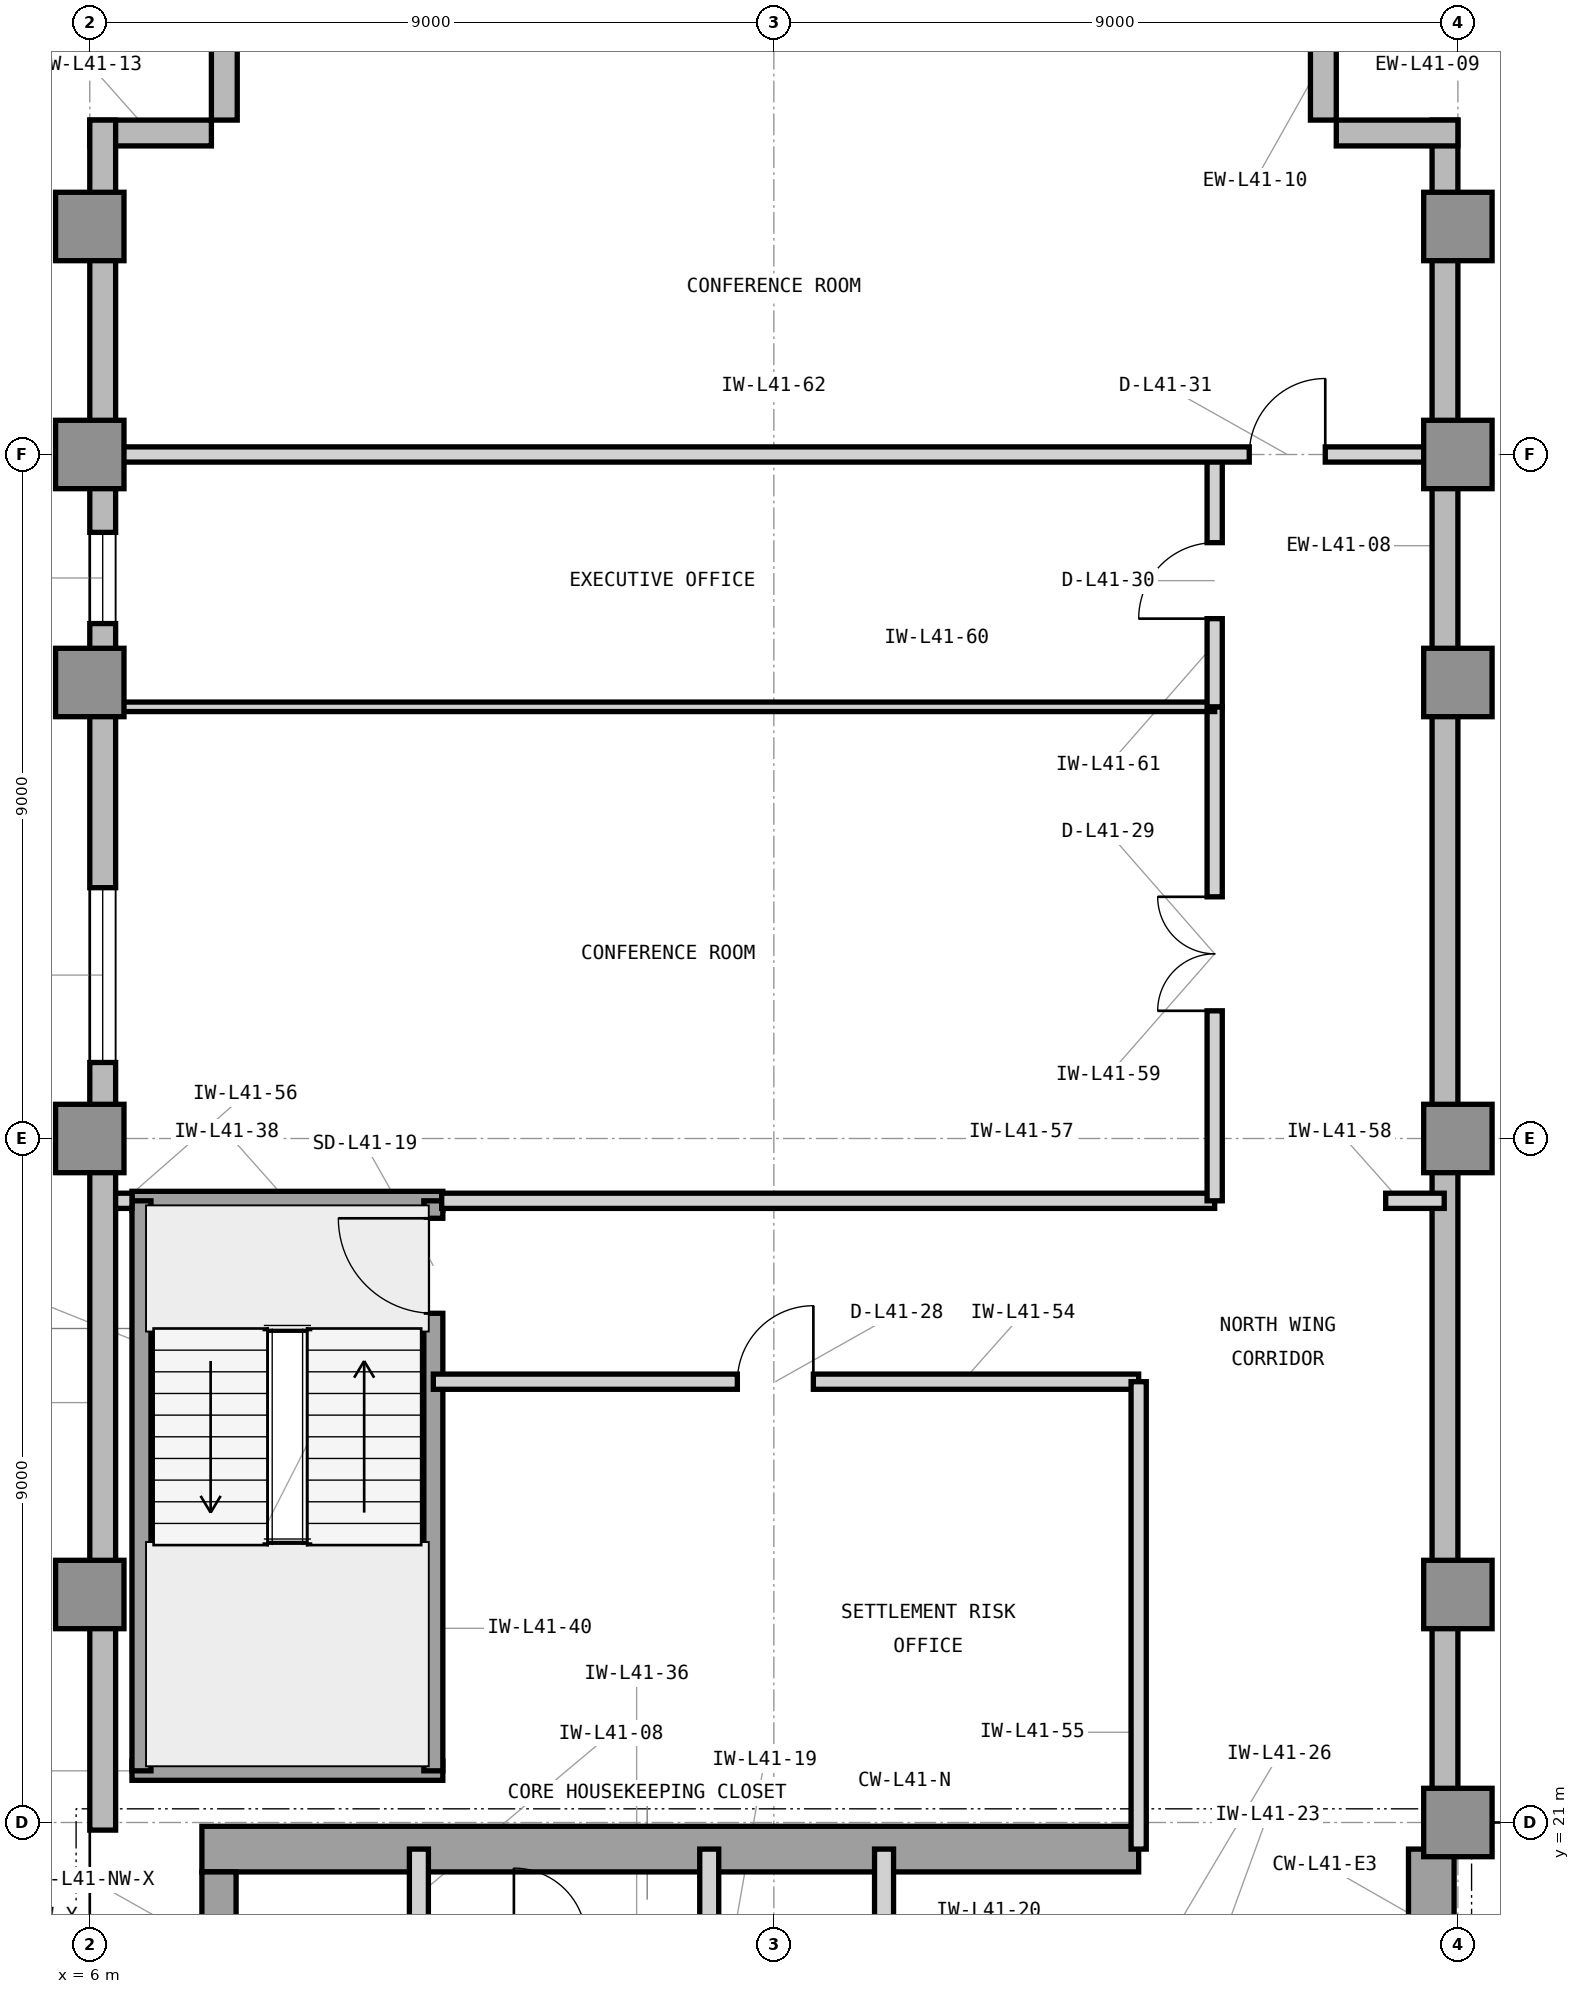
"""IFC4 building model, lengths in metres.
Left out: names, types, materials, properties, quantities, classifications, styles, units other than length and angle.
Written with IfcOpenShell. Run it as: python <this file> out.ifc"""

import sys

from ifc_helpers import new_model, si_unit, direction, frame, frame_2d, origin, origin_2d, place, context, subcontext, project, spatial, rectangle, extrude, element, fill, save


model = new_model("IFC4")
c1 = context("Model", 3, precision=1e-05, world=origin(), true_north=direction((0.0, 1.0)))
c2 = subcontext(c1, "Body", "Model", "MODEL_VIEW")
j1 = project(units=[si_unit("LENGTHUNIT", "METRE"), si_unit("PLANEANGLEUNIT", "RADIAN")], contexts=[c1])
p1 = place(None, origin())
s1 = spatial("IfcSite", under=j1, at=p1, CompositionType="ELEMENT")
p2 = place(p1, origin())
s2 = spatial("IfcBuilding", under=s1, at=p2, CompositionType="ELEMENT")
p3 = place(p2, frame((0.0, 0.0, 172.2)))
s3 = spatial("IfcBuildingStorey", under=s2, at=p3, CompositionType="ELEMENT", Elevation=172.2)
p4 = place(p3, frame((7.475, 20.65, 0.0), z_axis=(0.0, 0.0, 1.0), x_axis=(1.0, 0.0, 0.0)))
e1 = element("IfcWall", 1, at=p4, inside=s3, PredefinedType="SHEAR", context=c2, shape_type="SweptSolid", body=[
    extrude(rectangle(XDim=12.325, YDim=0.6, at=frame_2d((6.163, 0.0))), origin(), (0.0, 0.0, 1.0), 3.9),
])
p5 = place(p3, frame((23.65, 16.6, 0.0), z_axis=(0.0, 0.0, 1.0), x_axis=(0.0, 1.0, 0.0)))
e2 = element("IfcWall", 2, at=p5, inside=s3, PredefinedType="SHEAR", context=c2, shape_type="SweptSolid", body=[
    extrude(rectangle(XDim=4.05, YDim=0.6, at=frame_2d((2.025, 0.0))), origin(), (0.0, 0.0, 1.0), 3.9),
])
p6 = place(p3, frame((7.7, 19.575, 0.0), z_axis=(0.0, 0.0, 1.0), x_axis=(0.0, 1.0, 0.0)))
e3 = element("IfcWall", 3, at=p6, inside=s3, PredefinedType="SHEAR", context=c2, shape_type="SweptSolid", body=[
    extrude(rectangle(XDim=0.775, YDim=0.45, at=frame_2d((0.388, 0.0))), origin(), (0.0, 0.0, 1.0), 3.9),
])
for number, where, z_axis, x_axis in (
    (4, (24.0, 21.0, 0.0), (0.0, 0.0, 1.0), (1.0, 0.0, 0.0)),
    (5, (6.0, 24.0, 0.0), (0.0, 0.0, 1.0), (1.0, 0.0, 0.0)),
    (6, (24.0, 24.0, 0.0), (0.0, 0.0, 1.0), (1.0, 0.0, 0.0)),
    (7, (6.0, 30.0, 0.0), (0.0, 0.0, 1.0), (1.0, 0.0, 0.0)),
    (8, (24.0, 30.0, 0.0), (0.0, 0.0, 1.0), (1.0, 0.0, 0.0)),
    (9, (6.0, 36.0, 0.0), (0.0, 0.0, 1.0), (1.0, 0.0, 0.0)),
    (10, (24.0, 36.0, 0.0), (0.0, 0.0, 1.0), (1.0, 0.0, 0.0)),
    (11, (6.0, 39.0, 0.0), (0.0, 0.0, 1.0), (1.0, 0.0, 0.0)),
    (12, (24.0, 39.0, 0.0), (0.0, 0.0, 1.0), (1.0, 0.0, 0.0)),
    (13, (6.0, 42.0, 0.0), (0.0, 0.0, 1.0), (1.0, 0.0, 0.0)),
    (14, (24.0, 42.0, 0.0), (0.0, 0.0, 1.0), (1.0, 0.0, 0.0)),
):
    element("IfcColumn", number, at=place(p3, frame(where, z_axis=z_axis, x_axis=x_axis)), inside=s3, PredefinedType="COLUMN", context=c2, shape_type="SweptSolid", body=[
        extrude(rectangle(XDim=0.9, YDim=0.9, at=origin_2d()), origin(), (0.0, 0.0, 1.0), 3.9),
    ])
p7 = place(p3, frame((23.83, 21.0, 0.0), z_axis=(0.0, 0.0, 1.0), x_axis=(0.0, 1.0, 0.0)))
e15 = element("IfcWall", 15, at=p7, inside=s3, PredefinedType="STANDARD", context=c2, shape_type="SweptSolid", body=[
    extrude(rectangle(XDim=22.4, YDim=0.34, at=frame_2d((11.2, 0.0))), origin(), (0.0, 0.0, 1.0), 3.7),
])
for number, where, z_axis, x_axis in (
    (16, (24.0, 43.23, 0.0), (0.0, 0.0, 1.0), (-1.0, 0.0, 0.0)),
    (17, (22.23, 43.4, 0.0), (0.0, 0.0, 1.0), (0.0, 1.0, 0.0)),
    (18, (7.77, 45.0, 0.0), (0.0, 0.0, 1.0), (0.0, -1.0, 0.0)),
    (19, (7.6, 43.23, 0.0), (0.0, 0.0, 1.0), (-1.0, 0.0, 0.0)),
):
    element("IfcWall", number, at=place(p3, frame(where, z_axis=z_axis, x_axis=x_axis)), inside=s3, PredefinedType="STANDARD", context=c2, shape_type="SweptSolid", body=[
        extrude(rectangle(XDim=1.6, YDim=0.34, at=frame_2d((0.8, 0.0))), origin(), (0.0, 0.0, 1.0), 3.7),
    ])
p8 = place(p3, frame((6.17, 43.4, 0.0), z_axis=(0.0, 0.0, 1.0), x_axis=(0.0, -1.0, 0.0)))
e20 = element("IfcWall", 20, at=p8, inside=s3, PredefinedType="STANDARD", context=c2, shape_type="SweptSolid", body=[
    extrude(rectangle(XDim=22.5, YDim=0.34, at=frame_2d((11.25, 0.0))), origin(), (0.0, 0.0, 1.0), 3.7),
])
p9 = place(p8, frame((10.1, 0.0, 0.9)))
e21 = element("IfcOpeningElement", 21, at=p9, cuts=e20, PredefinedType="OPENING", context=c2, shape_type="SweptSolid", body=[
    extrude(rectangle(XDim=2.3, YDim=2.2, at=frame_2d((1.15, 1.1))), frame((0.0, 0.18, 0.0), z_axis=(0.0, -1.0, 0.0), x_axis=(1.0, 0.0, 0.0)), (0.0, 0.0, 1.0), 0.36),
])
p10 = place(p8, frame((5.425, 0.0, 0.9)))
e22 = element("IfcOpeningElement", 22, at=p10, cuts=e20, PredefinedType="OPENING", context=c2, shape_type="SweptSolid", body=[
    extrude(rectangle(XDim=1.2, YDim=2.2, at=frame_2d((0.6, 1.1))), frame((0.0, 0.18, 0.0), z_axis=(0.0, -1.0, 0.0), x_axis=(1.0, 0.0, 0.0)), (0.0, 0.0, 1.0), 0.36),
])
p11 = place(p3, frame((10.33, 19.45, 0.0), z_axis=(0.0, 0.0, 1.0), x_axis=(0.0, 1.0, 0.0)))
e23 = element("IfcWall", 23, at=p11, inside=s3, PredefinedType="PARTITIONING", context=c2, shape_type="SweptSolid", body=[
    extrude(rectangle(XDim=1.2, YDim=0.25, at=frame_2d((0.6, 0.0))), origin(), (0.0, 0.0, 1.0), 3.073),
])
for number, where, z_axis, x_axis in (
    (24, (14.15, 16.7, 0.0), (0.0, 0.0, 1.0), (0.0, 1.0, 0.0)),
    (25, (16.45, 16.7, 0.0), (0.0, 0.0, 1.0), (0.0, 1.0, 0.0)),
):
    element("IfcWall", number, at=place(p3, frame(where, z_axis=z_axis, x_axis=x_axis)), inside=s3, PredefinedType="PARTITIONING", context=c2, shape_type="SweptSolid", body=[
        extrude(rectangle(XDim=3.95, YDim=0.25, at=frame_2d((1.975, 0.0))), origin(), (0.0, 0.0, 1.0), 3.69),
    ])
for number, where, z_axis, x_axis in (
    (26, (6.555, 21.68, 0.0), (0.0, 0.0, 1.0), (1.0, 0.0, 0.0)),
    (27, (6.555, 29.18, 0.0), (0.0, 0.0, 1.0), (1.0, 0.0, 0.0)),
):
    element("IfcWall", number, at=place(p3, frame(where, z_axis=z_axis, x_axis=x_axis)), inside=s3, PredefinedType="SHEAR", context=c2, shape_type="SweptSolid", body=[
        extrude(rectangle(XDim=4.09, YDim=0.25, at=frame_2d((2.045, 0.0))), origin(), (0.0, 0.0, 1.0), 3.9),
    ])
p12 = place(p3, frame((6.68, 21.68, 0.0), z_axis=(0.0, 0.0, 1.0), x_axis=(0.0, 1.0, 0.0)))
e28 = element("IfcWall", 28, at=p12, inside=s3, PredefinedType="SHEAR", context=c2, shape_type="SweptSolid", body=[
    extrude(rectangle(XDim=7.5, YDim=0.25, at=frame_2d((3.75, 0.0))), origin(), (0.0, 0.0, 1.0), 3.9),
])
p13 = place(p3, frame((10.52, 21.68, 0.0), z_axis=(0.0, 0.0, 1.0), x_axis=(0.0, 1.0, 0.0)))
e29 = element("IfcWall", 29, at=p13, inside=s3, PredefinedType="SHEAR", context=c2, shape_type="SweptSolid", body=[
    extrude(rectangle(XDim=7.5, YDim=0.25, at=frame_2d((3.75, 0.0))), origin(), (0.0, 0.0, 1.0), 3.9),
])
p14 = place(p13, frame((6.02, 0.0, 0.0)))
e30 = element("IfcOpeningElement", 30, at=p14, cuts=e29, PredefinedType="OPENING", context=c2, shape_type="SweptSolid", body=[
    extrude(rectangle(XDim=1.25, YDim=2.2, at=frame_2d((0.625, 1.1))), frame((0.0, 0.135, 0.0), z_axis=(0.0, -1.0, 0.0), x_axis=(1.0, 0.0, 0.0)), (0.0, 0.0, 1.0), 0.27),
])
p15 = place(p3, frame((10.52, 26.8, 0.0), z_axis=(0.0, 0.0, 1.0), x_axis=(1.0, 0.0, 0.0)))
e31 = element("IfcWall", 31, at=p15, inside=s3, PredefinedType="PARTITIONING", context=c2, shape_type="SweptSolid", body=[
    extrude(rectangle(XDim=9.28, YDim=0.2, at=frame_2d((4.64, 0.0))), origin(), (0.0, 0.0, 1.0), 3.69),
])
p16 = place(p15, frame((4.0, 0.0, 0.0)))
e32 = element("IfcOpeningElement", 32, at=p16, cuts=e31, PredefinedType="OPENING", context=c2, shape_type="SweptSolid", body=[
    extrude(rectangle(XDim=1.0, YDim=2.15, at=frame_2d((0.5, 1.075))), frame((0.0, 0.11, 0.0), z_axis=(0.0, -1.0, 0.0), x_axis=(1.0, 0.0, 0.0)), (0.0, 0.0, 1.0), 0.22),
])
p17 = place(p3, frame((19.8, 20.65, 0.0), z_axis=(0.0, 0.0, 1.0), x_axis=(0.0, 1.0, 0.0)))
e33 = element("IfcWall", 33, at=p17, inside=s3, PredefinedType="PARTITIONING", context=c2, shape_type="SweptSolid", body=[
    extrude(rectangle(XDim=6.15, YDim=0.2, at=frame_2d((3.075, 0.0))), origin(), (0.0, 0.0, 1.0), 3.69),
])
p18 = place(p3, frame((6.34, 29.18, 0.0), z_axis=(0.0, 0.0, 1.0), x_axis=(1.0, 0.0, 0.0)))
e34 = element("IfcWall", 34, at=p18, inside=s3, PredefinedType="PARTITIONING", context=c2, shape_type="SweptSolid", body=[
    extrude(rectangle(XDim=0.215, YDim=0.2, at=frame_2d((0.107, 0.0))), origin(), (0.0, 0.0, 1.0), 3.69),
])
p19 = place(p3, frame((10.63, 29.18, 0.0), z_axis=(0.0, 0.0, 1.0), x_axis=(1.0, 0.0, 0.0)))
e35 = element("IfcWall", 35, at=p19, inside=s3, PredefinedType="PARTITIONING", context=c2, shape_type="SweptSolid", body=[
    extrude(rectangle(XDim=10.17, YDim=0.2, at=frame_2d((5.085, 0.0))), origin(), (0.0, 0.0, 1.0), 3.69),
])
p20 = place(p3, frame((23.05, 29.18, 0.0), z_axis=(0.0, 0.0, 1.0), x_axis=(1.0, 0.0, 0.0)))
e36 = element("IfcWall", 36, at=p20, inside=s3, PredefinedType="PARTITIONING", context=c2, shape_type="SweptSolid", body=[
    extrude(rectangle(XDim=0.77, YDim=0.2, at=frame_2d((0.385, 0.0))), origin(), (0.0, 0.0, 1.0), 3.69),
])
p21 = place(p3, frame((20.8, 29.18, 0.0), z_axis=(0.0, 0.0, 1.0), x_axis=(0.0, 1.0, 0.0)))
e37 = element("IfcWall", 37, at=p21, inside=s3, PredefinedType="PARTITIONING", context=c2, shape_type="SweptSolid", body=[
    extrude(rectangle(XDim=6.5, YDim=0.2, at=frame_2d((3.25, 0.0))), origin(), (0.0, 0.0, 1.0), 3.69),
])
p22 = place(p21, frame((2.5, 0.0, 0.0)))
e38 = element("IfcOpeningElement", 38, at=p22, cuts=e37, PredefinedType="OPENING", context=c2, shape_type="SweptSolid", body=[
    extrude(rectangle(XDim=1.5, YDim=2.3, at=frame_2d((0.75, 1.15))), frame((0.0, 0.11, 0.0), z_axis=(0.0, -1.0, 0.0), x_axis=(1.0, 0.0, 0.0)), (0.0, 0.0, 1.0), 0.22),
])
p23 = place(p3, frame((6.18, 35.68, 0.0), z_axis=(0.0, 0.0, 1.0), x_axis=(1.0, 0.0, 0.0)))
e39 = element("IfcWall", 39, at=p23, inside=s3, PredefinedType="PARTITIONING", context=c2, shape_type="SweptSolid", body=[
    extrude(rectangle(XDim=14.62, YDim=0.125, at=frame_2d((7.31, 0.0))), origin(), (0.0, 0.0, 1.0), 3.69),
])
p24 = place(p3, frame((20.8, 35.68, 0.0), z_axis=(0.0, 0.0, 1.0), x_axis=(0.0, 1.0, 0.0)))
e40 = element("IfcWall", 40, at=p24, inside=s3, PredefinedType="PARTITIONING", context=c2, shape_type="SweptSolid", body=[
    extrude(rectangle(XDim=3.32, YDim=0.2, at=frame_2d((1.66, 0.0))), origin(), (0.0, 0.0, 1.0), 3.69),
])
p25 = place(p24, frame((1.16, 0.0, 0.0)))
e41 = element("IfcOpeningElement", 41, at=p25, cuts=e40, PredefinedType="OPENING", context=c2, shape_type="SweptSolid", body=[
    extrude(rectangle(XDim=1.0, YDim=2.15, at=frame_2d((0.5, 1.075))), frame((0.0, 0.11, 0.0), z_axis=(0.0, -1.0, 0.0), x_axis=(1.0, 0.0, 0.0)), (0.0, 0.0, 1.0), 0.22),
])
p26 = place(p3, frame((6.18, 39.0, 0.0), z_axis=(0.0, 0.0, 1.0), x_axis=(1.0, 0.0, 0.0)))
e42 = element("IfcWall", 42, at=p26, inside=s3, PredefinedType="PARTITIONING", context=c2, shape_type="SweptSolid", body=[
    extrude(rectangle(XDim=17.64, YDim=0.2, at=frame_2d((8.82, 0.0))), origin(), (0.0, 0.0, 1.0), 3.073),
])
p27 = place(p26, frame((15.075, 0.0, 0.0)))
e43 = element("IfcOpeningElement", 43, at=p27, cuts=e42, PredefinedType="OPENING", context=c2, shape_type="SweptSolid", body=[
    extrude(rectangle(XDim=1.0, YDim=2.15, at=frame_2d((0.5, 1.075))), frame((0.0, 0.11, 0.0), z_axis=(0.0, -1.0, 0.0), x_axis=(1.0, 0.0, 0.0)), (0.0, 0.0, 1.0), 0.22),
])
p28 = place(p9, origin())
e44 = element("IfcWindow", 44, at=p28, inside=s3, PartitioningType="SINGLE_PANEL", PredefinedType="WINDOW", context=c2, shape_type="SweptSolid", body=[
    extrude(rectangle(XDim=2.3, YDim=2.2, at=frame_2d((1.15, 1.1))), frame((0.0, 0.11, 0.0), z_axis=(0.0, -1.0, 0.0), x_axis=(1.0, 0.0, 0.0)), (0.0, 0.0, 1.0), 0.06),
])
fill(e21, e44)
p29 = place(p14, origin())
e45 = element("IfcDoor", 45, at=p29, inside=s3, OperationType="SINGLE_SWING_RIGHT", PredefinedType="DOOR", context=c2, shape_type="SweptSolid", body=[
    extrude(rectangle(XDim=1.25, YDim=2.2, at=frame_2d((0.625, 1.1))), frame((0.0, 0.025, 0.0), z_axis=(0.0, -1.0, 0.0), x_axis=(1.0, 0.0, 0.0)), (0.0, 0.0, 1.0), 0.05),
])
fill(e30, e45)
p30 = place(p16, origin())
e46 = element("IfcDoor", 46, at=p30, inside=s3, OperationType="SINGLE_SWING_RIGHT", PredefinedType="DOOR", context=c2, shape_type="SweptSolid", body=[
    extrude(rectangle(XDim=1.0, YDim=2.15, at=frame_2d((0.5, 1.075))), frame((0.0, 0.025, 0.0), z_axis=(0.0, -1.0, 0.0), x_axis=(1.0, 0.0, 0.0)), (0.0, 0.0, 1.0), 0.05),
])
fill(e32, e46)
p31 = place(p22, origin())
e47 = element("IfcDoor", 47, at=p31, inside=s3, OperationType="DOUBLE_DOOR_SINGLE_SWING", PredefinedType="DOOR", context=c2, shape_type="SweptSolid", body=[
    extrude(rectangle(XDim=1.5, YDim=2.3, at=frame_2d((0.75, 1.15))), frame((0.0, 0.025, 0.0), z_axis=(0.0, -1.0, 0.0), x_axis=(1.0, 0.0, 0.0)), (0.0, 0.0, 1.0), 0.05),
])
fill(e38, e47)
p32 = place(p25, origin())
e48 = element("IfcDoor", 48, at=p32, inside=s3, OperationType="SINGLE_SWING_LEFT", PredefinedType="DOOR", context=c2, shape_type="SweptSolid", body=[
    extrude(rectangle(XDim=1.0, YDim=2.15, at=frame_2d((0.5, 1.075))), frame((0.0, 0.025, 0.0), z_axis=(0.0, -1.0, 0.0), x_axis=(1.0, 0.0, 0.0)), (0.0, 0.0, 1.0), 0.05),
])
fill(e41, e48)
p33 = place(p27, origin())
e49 = element("IfcDoor", 49, at=p33, inside=s3, OperationType="SINGLE_SWING_RIGHT", PredefinedType="DOOR", context=c2, shape_type="SweptSolid", body=[
    extrude(rectangle(XDim=1.0, YDim=2.15, at=frame_2d((0.5, 1.075))), frame((0.0, 0.025, 0.0), z_axis=(0.0, -1.0, 0.0), x_axis=(1.0, 0.0, 0.0)), (0.0, 0.0, 1.0), 0.05),
])
fill(e43, e49)
p34 = place(p10, origin())
e50 = element("IfcWindow", 50, at=p34, inside=s3, PartitioningType="SINGLE_PANEL", PredefinedType="WINDOW", context=c2, shape_type="SweptSolid", body=[
    extrude(rectangle(XDim=1.2, YDim=2.2, at=frame_2d((0.6, 1.1))), frame((0.0, 0.11, 0.0), z_axis=(0.0, -1.0, 0.0), x_axis=(1.0, 0.0, 0.0)), (0.0, 0.0, 1.0), 0.06),
])
fill(e22, e50)
save(model, sys.argv[1])
